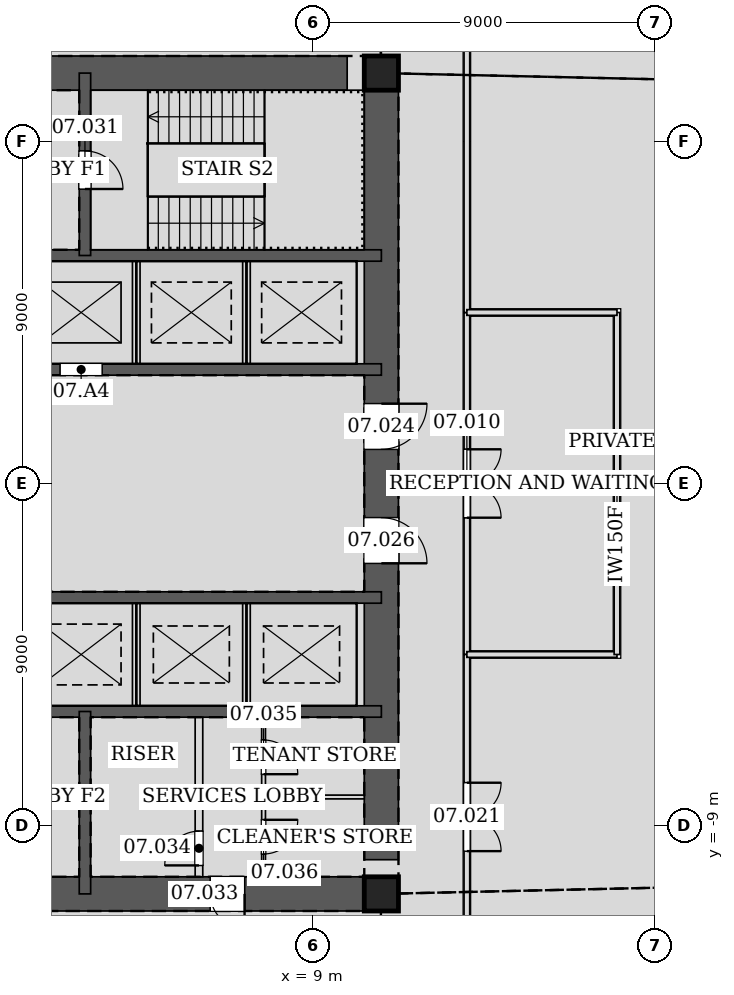
"""IFC4 building model, lengths in metres.
Left out: names, types, materials, properties, quantities, classifications, styles, units other than length and angle.
Written with IfcOpenShell. Run it as: python <this file> out.ifc"""

import sys

from ifc_helpers import new_model, si_unit, direction, frame, frame_2d, origin, origin_2d, place, context, subcontext, project, spatial, rectangle, hollow_rectangle, extrude, element, fill, save


model = new_model("IFC4")
c1 = context("Model", 3, precision=1e-05, world=origin(), true_north=direction((0.0, 1.0)))
c2 = subcontext(c1, "Body", "Model", "MODEL_VIEW")
j1 = project(units=[si_unit("LENGTHUNIT", "METRE"), si_unit("PLANEANGLEUNIT", "RADIAN")], contexts=[c1])
p1 = place(None, origin())
s1 = spatial("IfcSite", under=j1, at=p1, CompositionType="ELEMENT")
p2 = place(p1, origin())
s2 = spatial("IfcBuilding", under=s1, at=p2, CompositionType="ELEMENT")
p3 = place(p2, frame((0.0, 0.0, 37.2)))
s3 = spatial("IfcBuildingStorey", under=s2, at=p3, CompositionType="ELEMENT", Elevation=37.2)
for number, where, z_axis, x_axis in (
    (1, (10.8, 10.8, 0.0), (0.0, 0.0, 1.0), (1.0, 0.0, 0.0)),
    (2, (10.8, -10.8, 0.0), (0.0, 0.0, 1.0), (1.0, 0.0, 0.0)),
):
    element("IfcColumn", number, at=place(p3, frame(where, z_axis=z_axis, x_axis=x_axis)), inside=s3, PredefinedType="COLUMN", context=c2, shape_type="SweptSolid", body=[
        extrude(hollow_rectangle(XDim=0.9, YDim=0.9, WallThickness=0.06, at=origin_2d()), origin(), (0.0, 0.0, 1.0), 4.2),
    ])
p4 = place(p3, frame((-10.8, -10.8, 0.0), z_axis=(0.0, 0.0, 1.0), x_axis=(1.0, 0.0, 0.0)))
e3 = element("IfcWall", 3, at=p4, inside=s3, PredefinedType="SOLIDWALL", context=c2, shape_type="SweptSolid", body=[
    extrude(rectangle(XDim=21.6, YDim=0.9, at=frame_2d((10.8, 0.0))), origin(), (0.0, 0.0, 1.0), 4.2),
])
p5 = place(p4, frame((10.05, 0.0, 0.0)))
e4 = element("IfcOpeningElement", 4, at=p5, cuts=e3, PredefinedType="OPENING", context=c2, shape_type="SweptSolid", body=[
    extrude(rectangle(XDim=1.5, YDim=2.1, at=frame_2d((0.75, 1.05))), frame((0.0, 0.46, 0.0), z_axis=(0.0, -1.0, 0.0), x_axis=(1.0, 0.0, 0.0)), (0.0, 0.0, 1.0), 0.92),
])
p6 = place(p4, frame((17.1, 0.0, 0.0)))
e5 = element("IfcOpeningElement", 5, at=p6, cuts=e3, PredefinedType="OPENING", context=c2, shape_type="SweptSolid", body=[
    extrude(rectangle(XDim=0.9, YDim=2.1, at=frame_2d((0.45, 1.05))), frame((0.0, 0.46, 0.0), z_axis=(0.0, -1.0, 0.0), x_axis=(1.0, 0.0, 0.0)), (0.0, 0.0, 1.0), 0.92),
])
p7 = place(p3, frame((10.8, -10.8, 0.0), z_axis=(0.0, 0.0, 1.0), x_axis=(0.0, 1.0, 0.0)))
e6 = element("IfcWall", 6, at=p7, inside=s3, PredefinedType="SOLIDWALL", context=c2, shape_type="SweptSolid", body=[
    extrude(rectangle(XDim=21.6, YDim=0.9, at=frame_2d((10.8, 0.0))), origin(), (0.0, 0.0, 1.0), 4.2),
])
p8 = place(p7, frame((11.7, 0.0, 0.0)))
e7 = element("IfcOpeningElement", 7, at=p8, cuts=e6, PredefinedType="OPENING", context=c2, shape_type="SweptSolid", body=[
    extrude(rectangle(XDim=1.2, YDim=2.1, at=frame_2d((0.6, 1.05))), frame((0.0, 0.46, 0.0), z_axis=(0.0, -1.0, 0.0), x_axis=(1.0, 0.0, 0.0)), (0.0, 0.0, 1.0), 0.92),
])
p9 = place(p7, frame((8.7, 0.0, 0.0)))
e8 = element("IfcOpeningElement", 8, at=p9, cuts=e6, PredefinedType="OPENING", context=c2, shape_type="SweptSolid", body=[
    extrude(rectangle(XDim=1.2, YDim=2.1, at=frame_2d((0.6, 1.05))), frame((0.0, 0.46, 0.0), z_axis=(0.0, -1.0, 0.0), x_axis=(1.0, 0.0, 0.0)), (0.0, 0.0, 1.0), 0.92),
])
p10 = place(p3, frame((10.8, 10.8, 0.0), z_axis=(0.0, 0.0, 1.0), x_axis=(-1.0, 0.0, 0.0)))
e9 = element("IfcWall", 9, at=p10, inside=s3, PredefinedType="SOLIDWALL", context=c2, shape_type="SweptSolid", body=[
    extrude(rectangle(XDim=21.6, YDim=0.9, at=frame_2d((10.8, 0.0))), origin(), (0.0, 0.0, 1.0), 4.2),
])
p11 = place(p10, frame((10.05, 0.0, 0.0)))
e10 = element("IfcOpeningElement", 10, at=p11, cuts=e9, PredefinedType="OPENING", context=c2, shape_type="SweptSolid", body=[
    extrude(rectangle(XDim=1.5, YDim=2.1, at=frame_2d((0.75, 1.05))), frame((0.0, 0.46, 0.0), z_axis=(0.0, -1.0, 0.0), x_axis=(1.0, 0.0, 0.0)), (0.0, 0.0, 1.0), 0.92),
])
p12 = place(p3, frame((-10.8, 3.0, 0.0), z_axis=(0.0, 0.0, 1.0), x_axis=(1.0, 0.0, 0.0)))
e11 = element("IfcWall", 11, at=p12, inside=s3, PredefinedType="SOLIDWALL", context=c2, shape_type="SweptSolid", body=[
    extrude(rectangle(XDim=21.6, YDim=0.3, at=frame_2d((10.8, 0.0))), origin(), (0.0, 0.0, 1.0), 4.2),
])
p13 = place(p12, frame((1.55, 0.0, 0.0)))
e12 = element("IfcOpeningElement", 12, at=p13, cuts=e11, PredefinedType="OPENING", context=c2, shape_type="SweptSolid", body=[
    extrude(rectangle(XDim=1.1, YDim=2.1, at=frame_2d((0.55, 1.05))), frame((0.0, 0.16, 0.0), z_axis=(0.0, -1.0, 0.0), x_axis=(1.0, 0.0, 0.0)), (0.0, 0.0, 1.0), 0.32),
])
p14 = place(p12, frame((4.45, 0.0, 0.0)))
e13 = element("IfcOpeningElement", 13, at=p14, cuts=e11, PredefinedType="OPENING", context=c2, shape_type="SweptSolid", body=[
    extrude(rectangle(XDim=1.1, YDim=2.1, at=frame_2d((0.55, 1.05))), frame((0.0, 0.16, 0.0), z_axis=(0.0, -1.0, 0.0), x_axis=(1.0, 0.0, 0.0)), (0.0, 0.0, 1.0), 0.32),
])
p15 = place(p12, frame((7.35, 0.0, 0.0)))
e14 = element("IfcOpeningElement", 14, at=p15, cuts=e11, PredefinedType="OPENING", context=c2, shape_type="SweptSolid", body=[
    extrude(rectangle(XDim=1.1, YDim=2.1, at=frame_2d((0.55, 1.05))), frame((0.0, 0.16, 0.0), z_axis=(0.0, -1.0, 0.0), x_axis=(1.0, 0.0, 0.0)), (0.0, 0.0, 1.0), 0.32),
])
p16 = place(p12, frame((13.15, 0.0, 0.0)))
e15 = element("IfcOpeningElement", 15, at=p16, cuts=e11, PredefinedType="OPENING", context=c2, shape_type="SweptSolid", body=[
    extrude(rectangle(XDim=1.1, YDim=2.1, at=frame_2d((0.55, 1.05))), frame((0.0, 0.16, 0.0), z_axis=(0.0, -1.0, 0.0), x_axis=(1.0, 0.0, 0.0)), (0.0, 0.0, 1.0), 0.32),
])
p17 = place(p3, frame((-10.8, 6.0, 0.0), z_axis=(0.0, 0.0, 1.0), x_axis=(1.0, 0.0, 0.0)))
e16 = element("IfcWall", 16, at=p17, inside=s3, PredefinedType="SOLIDWALL", context=c2, shape_type="SweptSolid", body=[
    extrude(rectangle(XDim=21.6, YDim=0.3, at=frame_2d((10.8, 0.0))), origin(), (0.0, 0.0, 1.0), 4.2),
])
p18 = place(p17, frame((10.25, 0.0, 0.0)))
e17 = element("IfcOpeningElement", 17, at=p18, cuts=e16, PredefinedType="OPENING", context=c2, shape_type="SweptSolid", body=[
    extrude(rectangle(XDim=1.1, YDim=2.1, at=frame_2d((0.55, 1.05))), frame((0.0, 0.16, 0.0), z_axis=(0.0, -1.0, 0.0), x_axis=(1.0, 0.0, 0.0)), (0.0, 0.0, 1.0), 0.32),
])
p19 = place(p3, frame((3.0, 6.0, 0.0), z_axis=(0.0, 0.0, 1.0), x_axis=(0.0, 1.0, 0.0)))
e18 = element("IfcWall", 18, at=p19, inside=s3, PredefinedType="SOLIDWALL", context=c2, shape_type="SweptSolid", body=[
    extrude(rectangle(XDim=4.8, YDim=0.3, at=frame_2d((2.4, 0.0))), origin(), (0.0, 0.0, 1.0), 4.2),
])
p20 = place(p19, frame((1.75, 0.0, 0.0)))
e19 = element("IfcOpeningElement", 19, at=p20, cuts=e18, PredefinedType="OPENING", context=c2, shape_type="SweptSolid", body=[
    extrude(rectangle(XDim=1.0, YDim=2.1, at=frame_2d((0.5, 1.05))), frame((0.0, 0.16, 0.0), z_axis=(0.0, -1.0, 0.0), x_axis=(1.0, 0.0, 0.0)), (0.0, 0.0, 1.0), 0.32),
])
p21 = place(p3, frame((-10.8, -3.0, 0.0), z_axis=(0.0, 0.0, 1.0), x_axis=(1.0, 0.0, 0.0)))
e20 = element("IfcWall", 20, at=p21, inside=s3, PredefinedType="SOLIDWALL", context=c2, shape_type="SweptSolid", body=[
    extrude(rectangle(XDim=21.6, YDim=0.3, at=frame_2d((10.8, 0.0))), origin(), (0.0, 0.0, 1.0), 4.2),
])
p22 = place(p3, frame((-10.8, -6.0, 0.0), z_axis=(0.0, 0.0, 1.0), x_axis=(1.0, 0.0, 0.0)))
e21 = element("IfcWall", 21, at=p22, inside=s3, PredefinedType="SOLIDWALL", context=c2, shape_type="SweptSolid", body=[
    extrude(rectangle(XDim=21.6, YDim=0.3, at=frame_2d((10.8, 0.0))), origin(), (0.0, 0.0, 1.0), 4.2),
])
p23 = place(p22, frame((10.25, 0.0, 0.0)))
e22 = element("IfcOpeningElement", 22, at=p23, cuts=e21, PredefinedType="OPENING", context=c2, shape_type="SweptSolid", body=[
    extrude(rectangle(XDim=1.1, YDim=2.1, at=frame_2d((0.55, 1.05))), frame((0.0, 0.16, 0.0), z_axis=(0.0, -1.0, 0.0), x_axis=(1.0, 0.0, 0.0)), (0.0, 0.0, 1.0), 0.32),
])
p24 = place(p3, frame((3.0, -6.0, 0.0), z_axis=(0.0, 0.0, 1.0), x_axis=(0.0, -1.0, 0.0)))
e23 = element("IfcWall", 23, at=p24, inside=s3, PredefinedType="SOLIDWALL", context=c2, shape_type="SweptSolid", body=[
    extrude(rectangle(XDim=4.8, YDim=0.3, at=frame_2d((2.4, 0.0))), origin(), (0.0, 0.0, 1.0), 4.2),
])
p25 = place(p3, frame((13.05, -4.501, 0.0), z_axis=(0.0, 0.0, 1.0), x_axis=(0.0, 1.0, 0.0)))
e24 = element("IfcWall", 24, at=p25, inside=s3, PredefinedType="PARTITIONING", context=c2, shape_type="SweptSolid", body=[
    extrude(rectangle(XDim=9.002, YDim=0.15, at=frame_2d((4.501, 0.0))), origin(), (0.0, 0.0, 1.0), 2.984),
])
p26 = place(p25, frame((3.601, 0.0, 0.0)))
e25 = element("IfcOpeningElement", 25, at=p26, cuts=e24, PredefinedType="OPENING", context=c2, shape_type="SweptSolid", body=[
    extrude(rectangle(XDim=1.8, YDim=2.4, at=frame_2d((0.9, 1.2))), frame((0.0, 0.085, 0.0), z_axis=(0.0, -1.0, 0.0), x_axis=(1.0, 0.0, 0.0)), (0.0, 0.0, 1.0), 0.17),
])
p27 = place(p3, frame((13.05, -13.05, 0.0), z_axis=(0.0, 0.0, 1.0), x_axis=(0.0, 1.0, 0.0)))
e26 = element("IfcWall", 26, at=p27, inside=s3, PredefinedType="PARTITIONING", context=c2, shape_type="SweptSolid", body=[
    extrude(rectangle(XDim=8.551, YDim=0.15, at=frame_2d((4.275, 0.0))), origin(), (0.0, 0.0, 1.0), 3.014),
])
p28 = place(p27, frame((3.375, 0.0, 0.0)))
e27 = element("IfcOpeningElement", 27, at=p28, cuts=e26, PredefinedType="OPENING", context=c2, shape_type="SweptSolid", body=[
    extrude(rectangle(XDim=1.8, YDim=2.4, at=frame_2d((0.9, 1.2))), frame((0.0, 0.085, 0.0), z_axis=(0.0, -1.0, 0.0), x_axis=(1.0, 0.0, 0.0)), (0.0, 0.0, 1.0), 0.17),
])
p29 = place(p3, frame((13.05, 4.499, 0.0), z_axis=(0.0, 0.0, 1.0), x_axis=(0.0, 1.0, 0.0)))
e28 = element("IfcWall", 28, at=p29, inside=s3, PredefinedType="PARTITIONING", context=c2, shape_type="SweptSolid", body=[
    extrude(rectangle(XDim=8.551, YDim=0.15, at=frame_2d((4.275, 0.0))), origin(), (0.0, 0.0, 1.0), 3.014),
])
p30 = place(p3, frame((13.05, -4.5, 0.0), z_axis=(0.0, 0.0, 1.0), x_axis=(1.0, 0.0, 0.0)))
e29 = element("IfcWall", 29, at=p30, inside=s3, PredefinedType="PARTITIONING", context=c2, shape_type="SweptSolid", body=[
    extrude(rectangle(XDim=3.95, YDim=0.15, at=frame_2d((1.975, 0.0))), origin(), (0.0, 0.0, 1.0), 3.426),
])
p31 = place(p3, frame((17.0, -4.5, 0.0), z_axis=(0.0, 0.0, 1.0), x_axis=(0.0, 1.0, 0.0)))
e30 = element("IfcWall", 30, at=p31, inside=s3, PredefinedType="PARTITIONING", context=c2, shape_type="SweptSolid", body=[
    extrude(rectangle(XDim=9.0, YDim=0.15, at=frame_2d((4.5, 0.0))), origin(), (0.0, 0.0, 1.0), 2.984),
])
p32 = place(p3, frame((17.0, 4.5, 0.0), z_axis=(0.0, 0.0, 1.0), x_axis=(-1.0, 0.0, 0.0)))
e31 = element("IfcWall", 31, at=p32, inside=s3, PredefinedType="PARTITIONING", context=c2, shape_type="SweptSolid", body=[
    extrude(rectangle(XDim=3.95, YDim=0.15, at=frame_2d((1.975, 0.0))), origin(), (0.0, 0.0, 1.0), 3.426),
])
for number, where, z_axis, x_axis in (
    (32, (4.35, 3.15, 0.0), (0.0, 0.0, 1.0), (0.0, 1.0, 0.0)),
    (33, (7.25, 3.15, 0.0), (0.0, 0.0, 1.0), (0.0, 1.0, 0.0)),
    (34, (4.35, -5.85, 0.0), (0.0, 0.0, 1.0), (0.0, 1.0, 0.0)),
    (35, (7.25, -5.85, 0.0), (0.0, 0.0, 1.0), (0.0, 1.0, 0.0)),
):
    element("IfcWall", number, at=place(p3, frame(where, z_axis=z_axis, x_axis=x_axis)), inside=s3, PredefinedType="PARTITIONING", context=c2, shape_type="SweptSolid", body=[
        extrude(rectangle(XDim=2.7, YDim=0.2, at=frame_2d((1.35, 0.0))), origin(), (0.0, 0.0, 1.0), 4.2),
    ])
p33 = place(p3, frame((6.0, -10.35, 0.0), z_axis=(0.0, 0.0, 1.0), x_axis=(0.0, 1.0, 0.0)))
e36 = element("IfcWall", 36, at=p33, inside=s3, PredefinedType="PARTITIONING", context=c2, shape_type="SweptSolid", body=[
    extrude(rectangle(XDim=4.2, YDim=0.2, at=frame_2d((2.1, 0.0))), origin(), (0.0, 0.0, 1.0), 4.035),
])
p34 = place(p33, frame((0.3, 0.0, 0.0)))
e37 = element("IfcOpeningElement", 37, at=p34, cuts=e36, PredefinedType="OPENING", context=c2, shape_type="SweptSolid", body=[
    extrude(rectangle(XDim=0.9, YDim=2.1, at=frame_2d((0.45, 1.05))), frame((0.0, 0.11, 0.0), z_axis=(0.0, -1.0, 0.0), x_axis=(1.0, 0.0, 0.0)), (0.0, 0.0, 1.0), 0.22),
])
p35 = place(p3, frame((7.7, -10.35, 0.0), z_axis=(0.0, 0.0, 1.0), x_axis=(0.0, 1.0, 0.0)))
e38 = element("IfcWall", 38, at=p35, inside=s3, PredefinedType="PARTITIONING", context=c2, shape_type="SweptSolid", body=[
    extrude(rectangle(XDim=4.2, YDim=0.1, at=frame_2d((2.1, 0.0))), origin(), (0.0, 0.0, 1.0), 4.035),
])
p36 = place(p35, frame((2.7, 0.0, 0.0)))
e39 = element("IfcOpeningElement", 39, at=p36, cuts=e38, PredefinedType="OPENING", context=c2, shape_type="SweptSolid", body=[
    extrude(rectangle(XDim=0.9, YDim=2.1, at=frame_2d((0.45, 1.05))), frame((0.0, 0.06, 0.0), z_axis=(0.0, -1.0, 0.0), x_axis=(1.0, 0.0, 0.0)), (0.0, 0.0, 1.0), 0.12),
])
p37 = place(p35, frame((0.6, 0.0, 0.0)))
e40 = element("IfcOpeningElement", 40, at=p37, cuts=e38, PredefinedType="OPENING", context=c2, shape_type="SweptSolid", body=[
    extrude(rectangle(XDim=0.9, YDim=2.1, at=frame_2d((0.45, 1.05))), frame((0.0, 0.06, 0.0), z_axis=(0.0, -1.0, 0.0), x_axis=(1.0, 0.0, 0.0)), (0.0, 0.0, 1.0), 0.12),
])
p38 = place(p3, frame((7.7, -8.25, 0.0), z_axis=(0.0, 0.0, 1.0), x_axis=(1.0, 0.0, 0.0)))
e41 = element("IfcWall", 41, at=p38, inside=s3, PredefinedType="PARTITIONING", context=c2, shape_type="SweptSolid", body=[
    extrude(rectangle(XDim=2.65, YDim=0.1, at=frame_2d((1.325, 0.0))), origin(), (0.0, 0.0, 1.0), 4.035),
])
p39 = place(p26, frame((1.8, 0.0, 0.0), z_axis=(0.0, 0.0, 1.0), x_axis=(-1.0, 0.0, 0.0)))
e42 = element("IfcDoor", 42, at=p39, inside=s3, OperationType="DOUBLE_DOOR_SINGLE_SWING", PredefinedType="DOOR", context=c2, shape_type="SweptSolid", body=[
    extrude(rectangle(XDim=1.8, YDim=2.4, at=frame_2d((0.9, 1.2))), frame((0.0, 0.025, 0.0), z_axis=(0.0, -1.0, 0.0), x_axis=(1.0, 0.0, 0.0)), (0.0, 0.0, 1.0), 0.05),
])
fill(e25, e42)
p40 = place(p28, frame((1.8, 0.0, 0.0), z_axis=(0.0, 0.0, 1.0), x_axis=(-1.0, 0.0, 0.0)))
e43 = element("IfcDoor", 43, at=p40, inside=s3, OperationType="DOUBLE_DOOR_SINGLE_SWING", PredefinedType="DOOR", context=c2, shape_type="SweptSolid", body=[
    extrude(rectangle(XDim=1.8, YDim=2.4, at=frame_2d((0.9, 1.2))), frame((0.0, 0.025, 0.0), z_axis=(0.0, -1.0, 0.0), x_axis=(1.0, 0.0, 0.0)), (0.0, 0.0, 1.0), 0.05),
])
fill(e27, e43)
p41 = place(p8, frame((1.2, 0.0, 0.0), z_axis=(0.0, 0.0, 1.0), x_axis=(-1.0, 0.0, 0.0)))
e44 = element("IfcDoor", 44, at=p41, inside=s3, OperationType="SINGLE_SWING_LEFT", PredefinedType="DOOR", context=c2, shape_type="SweptSolid", body=[
    extrude(rectangle(XDim=1.2, YDim=2.1, at=frame_2d((0.6, 1.05))), frame((0.0, 0.025, 0.0), z_axis=(0.0, -1.0, 0.0), x_axis=(1.0, 0.0, 0.0)), (0.0, 0.0, 1.0), 0.05),
])
fill(e7, e44)
p42 = place(p9, frame((1.2, 0.0, 0.0), z_axis=(0.0, 0.0, 1.0), x_axis=(-1.0, 0.0, 0.0)))
e45 = element("IfcDoor", 45, at=p42, inside=s3, OperationType="SINGLE_SWING_RIGHT", PredefinedType="DOOR", context=c2, shape_type="SweptSolid", body=[
    extrude(rectangle(XDim=1.2, YDim=2.1, at=frame_2d((0.6, 1.05))), frame((0.0, 0.025, 0.0), z_axis=(0.0, -1.0, 0.0), x_axis=(1.0, 0.0, 0.0)), (0.0, 0.0, 1.0), 0.05),
])
fill(e8, e45)
p43 = place(p20, frame((1.0, 0.0, 0.0), z_axis=(0.0, 0.0, 1.0), x_axis=(-1.0, 0.0, 0.0)))
e46 = element("IfcDoor", 46, at=p43, inside=s3, OperationType="SINGLE_SWING_RIGHT", PredefinedType="DOOR", context=c2, shape_type="SweptSolid", body=[
    extrude(rectangle(XDim=1.0, YDim=2.1, at=frame_2d((0.5, 1.05))), frame((0.0, 0.025, 0.0), z_axis=(0.0, -1.0, 0.0), x_axis=(1.0, 0.0, 0.0)), (0.0, 0.0, 1.0), 0.05),
])
fill(e19, e46)
p44 = place(p6, frame((0.9, 0.0, 0.0), z_axis=(0.0, 0.0, 1.0), x_axis=(-1.0, 0.0, 0.0)))
e47 = element("IfcDoor", 47, at=p44, inside=s3, OperationType="SINGLE_SWING_LEFT", PredefinedType="DOOR", context=c2, shape_type="SweptSolid", body=[
    extrude(rectangle(XDim=0.9, YDim=2.1, at=frame_2d((0.45, 1.05))), frame((0.0, 0.025, 0.0), z_axis=(0.0, -1.0, 0.0), x_axis=(1.0, 0.0, 0.0)), (0.0, 0.0, 1.0), 0.05),
])
fill(e5, e47)
p45 = place(p34, origin())
e48 = element("IfcDoor", 48, at=p45, inside=s3, OperationType="SINGLE_SWING_LEFT", PredefinedType="DOOR", context=c2, shape_type="SweptSolid", body=[
    extrude(rectangle(XDim=0.9, YDim=2.1, at=frame_2d((0.45, 1.05))), frame((0.0, 0.025, 0.0), z_axis=(0.0, -1.0, 0.0), x_axis=(1.0, 0.0, 0.0)), (0.0, 0.0, 1.0), 0.05),
])
fill(e37, e48)
p46 = place(p36, frame((0.9, 0.0, 0.0), z_axis=(0.0, 0.0, 1.0), x_axis=(-1.0, 0.0, 0.0)))
e49 = element("IfcDoor", 49, at=p46, inside=s3, OperationType="SINGLE_SWING_RIGHT", PredefinedType="DOOR", context=c2, shape_type="SweptSolid", body=[
    extrude(rectangle(XDim=0.9, YDim=2.1, at=frame_2d((0.45, 1.05))), frame((0.0, 0.025, 0.0), z_axis=(0.0, -1.0, 0.0), x_axis=(1.0, 0.0, 0.0)), (0.0, 0.0, 1.0), 0.05),
])
fill(e39, e49)
p47 = place(p37, frame((0.9, 0.0, 0.0), z_axis=(0.0, 0.0, 1.0), x_axis=(-1.0, 0.0, 0.0)))
e50 = element("IfcDoor", 50, at=p47, inside=s3, OperationType="SINGLE_SWING_LEFT", PredefinedType="DOOR", context=c2, shape_type="SweptSolid", body=[
    extrude(rectangle(XDim=0.9, YDim=2.1, at=frame_2d((0.45, 1.05))), frame((0.0, 0.025, 0.0), z_axis=(0.0, -1.0, 0.0), x_axis=(1.0, 0.0, 0.0)), (0.0, 0.0, 1.0), 0.05),
])
fill(e40, e50)
p48 = place(p16, origin())
e51 = element("IfcDoor", 51, at=p48, inside=s3, OperationType="DOUBLE_DOOR_SLIDING", PredefinedType="DOOR", context=c2, shape_type="SweptSolid", body=[
    extrude(rectangle(XDim=1.1, YDim=2.1, at=frame_2d((0.55, 1.05))), frame((0.0, 0.025, 0.0), z_axis=(0.0, -1.0, 0.0), x_axis=(1.0, 0.0, 0.0)), (0.0, 0.0, 1.0), 0.05),
])
fill(e15, e51)
save(model, sys.argv[1])
